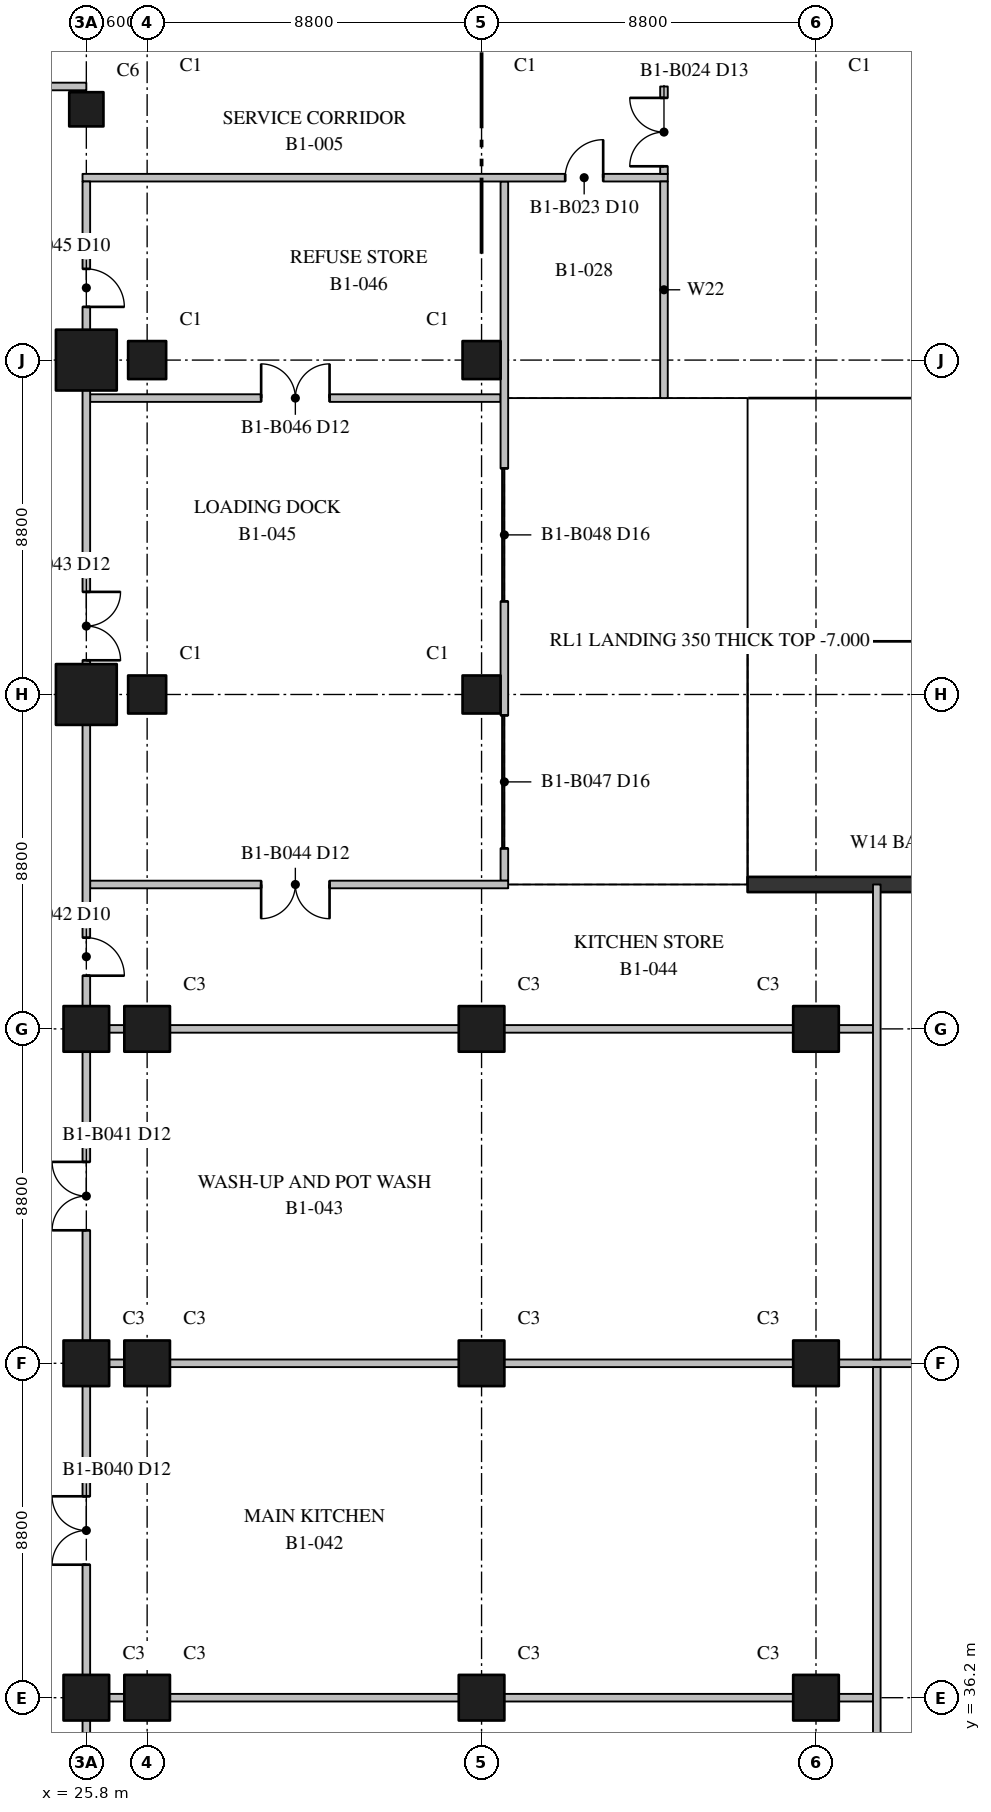
"""IFC4 building model, lengths in metres.
Left out: names, types, materials, properties, quantities, classifications, styles, units other than length and angle.
Written with IfcOpenShell. Run it as: python <this file> out.ifc"""

import sys

from ifc_helpers import new_model, si_unit, direction, frame, frame_2d, origin, origin_2d, place, context, subcontext, project, spatial, polyline, rectangle, outline, extrude, element, fill, save


model = new_model("IFC4")
c1 = context("Model", 3, precision=1e-05, world=origin(), true_north=direction((0.0, 1.0)))
c2 = subcontext(c1, "Body", "Model", "MODEL_VIEW")
j1 = project(units=[si_unit("LENGTHUNIT", "METRE"), si_unit("PLANEANGLEUNIT", "RADIAN")], contexts=[c1])
p1 = place(None, origin())
s1 = spatial("IfcSite", under=j1, at=p1, CompositionType="ELEMENT")
p2 = place(p1, origin())
s2 = spatial("IfcBuilding", under=s1, at=p2, CompositionType="ELEMENT")
p3 = place(p2, frame((0.0, 0.0, -7.0)))
s3 = spatial("IfcBuildingStorey", under=s2, at=p3, CompositionType="ELEMENT", Elevation=-7.0)
for number, where, z_axis, x_axis in (
    (1, (25.8, 36.2, 0.0), (0.0, 0.0, 1.0), (1.0, 0.0, 0.0)),
    (2, (25.8, 45.0, 0.0), (0.0, 0.0, 1.0), (1.0, 0.0, 0.0)),
    (3, (25.8, 53.8, 0.0), (0.0, 0.0, 1.0), (1.0, 0.0, 0.0)),
):
    element("IfcColumn", number, at=place(p3, frame(where, z_axis=z_axis, x_axis=x_axis)), inside=s3, PredefinedType="COLUMN", context=c2, shape_type="SweptSolid", body=[
        extrude(rectangle(XDim=1.2, YDim=1.2, at=origin_2d()), origin(), (0.0, 0.0, 1.0), 7.0),
    ])
for number, where, z_axis, x_axis in (
    (4, (25.8, 62.6, 0.0), (0.0, 0.0, 1.0), (1.0, 0.0, 0.0)),
    (5, (25.8, 71.4, 0.0), (0.0, 0.0, 1.0), (1.0, 0.0, 0.0)),
):
    element("IfcColumn", number, at=place(p3, frame(where, z_axis=z_axis, x_axis=x_axis)), inside=s3, PredefinedType="COLUMN", context=c2, shape_type="SweptSolid", body=[
        extrude(rectangle(XDim=1.6, YDim=1.6, at=origin_2d()), origin(), (0.0, 0.0, 1.0), 7.0),
    ])
for number, where, z_axis, x_axis in (
    (6, (27.4, 36.2, 0.0), (0.0, 0.0, 1.0), (1.0, 0.0, 0.0)),
    (7, (27.4, 45.0, 0.0), (0.0, 0.0, 1.0), (1.0, 0.0, 0.0)),
    (8, (27.4, 53.8, 0.0), (0.0, 0.0, 1.0), (1.0, 0.0, 0.0)),
):
    element("IfcColumn", number, at=place(p3, frame(where, z_axis=z_axis, x_axis=x_axis)), inside=s3, PredefinedType="COLUMN", context=c2, shape_type="SweptSolid", body=[
        extrude(rectangle(XDim=1.2, YDim=1.2, at=origin_2d()), origin(), (0.0, 0.0, 1.0), 7.0),
    ])
for number, where, z_axis, x_axis in (
    (9, (27.4, 62.6, 0.0), (0.0, 0.0, 1.0), (1.0, 0.0, 0.0)),
    (10, (27.4, 71.4, 0.0), (0.0, 0.0, 1.0), (1.0, 0.0, 0.0)),
):
    element("IfcColumn", number, at=place(p3, frame(where, z_axis=z_axis, x_axis=x_axis)), inside=s3, PredefinedType="COLUMN", context=c2, shape_type="SweptSolid", body=[
        extrude(rectangle(XDim=1.0, YDim=1.0, at=origin_2d()), origin(), (0.0, 0.0, 1.0), 7.0),
    ])
for number, where, z_axis, x_axis in (
    (11, (36.2, 36.2, 0.0), (0.0, 0.0, 1.0), (1.0, 0.0, 0.0)),
    (12, (36.2, 45.0, 0.0), (0.0, 0.0, 1.0), (1.0, 0.0, 0.0)),
    (13, (36.2, 53.8, 0.0), (0.0, 0.0, 1.0), (1.0, 0.0, 0.0)),
):
    element("IfcColumn", number, at=place(p3, frame(where, z_axis=z_axis, x_axis=x_axis)), inside=s3, PredefinedType="COLUMN", context=c2, shape_type="SweptSolid", body=[
        extrude(rectangle(XDim=1.2, YDim=1.2, at=origin_2d()), origin(), (0.0, 0.0, 1.0), 7.0),
    ])
for number, where, z_axis, x_axis in (
    (14, (36.2, 62.6, 0.0), (0.0, 0.0, 1.0), (1.0, 0.0, 0.0)),
    (15, (36.2, 71.4, 0.0), (0.0, 0.0, 1.0), (1.0, 0.0, 0.0)),
):
    element("IfcColumn", number, at=place(p3, frame(where, z_axis=z_axis, x_axis=x_axis)), inside=s3, PredefinedType="COLUMN", context=c2, shape_type="SweptSolid", body=[
        extrude(rectangle(XDim=1.0, YDim=1.0, at=origin_2d()), origin(), (0.0, 0.0, 1.0), 7.0),
    ])
for number, where, z_axis, x_axis in (
    (16, (45.0, 36.2, 0.0), (0.0, 0.0, 1.0), (1.0, 0.0, 0.0)),
    (17, (45.0, 45.0, 0.0), (0.0, 0.0, 1.0), (1.0, 0.0, 0.0)),
    (18, (45.0, 53.8, 0.0), (0.0, 0.0, 1.0), (1.0, 0.0, 0.0)),
):
    element("IfcColumn", number, at=place(p3, frame(where, z_axis=z_axis, x_axis=x_axis)), inside=s3, PredefinedType="COLUMN", context=c2, shape_type="SweptSolid", body=[
        extrude(rectangle(XDim=1.2, YDim=1.2, at=origin_2d()), origin(), (0.0, 0.0, 1.0), 7.0),
    ])
p4 = place(p3, frame((25.8, 78.0, 0.0), z_axis=(0.0, 0.0, 1.0), x_axis=(1.0, 0.0, 0.0)))
e19 = element("IfcColumn", 19, at=p4, inside=s3, PredefinedType="COLUMN", context=c2, shape_type="SweptSolid", body=[
    extrude(rectangle(XDim=0.9, YDim=0.9, at=origin_2d()), origin(), (0.0, 0.0, 1.0), 7.0),
])
p5 = place(p3, frame((43.2, 57.6, 0.0), z_axis=(0.0, 0.0, 1.0), x_axis=(1.0, 0.0, 0.0)))
e20 = element("IfcWall", 20, at=p5, inside=s3, PredefinedType="SHEAR", context=c2, shape_type="SweptSolid", body=[
    extrude(outline(polyline([(0.0, 0.0), (27.0, 0.0), (27.0, 4.15), (24.3, 3.7), (21.6, 3.25), (18.9, 2.8), (16.2, 2.35), (13.5, 1.9), (10.8, 1.45), (8.1, 1.0), (5.4, 0.55), (2.7, 0.1), (0.0, 0.05), (0.0, 0.0)])), frame((0.0, 0.2, 0.0), z_axis=(0.0, -1.0, 0.0), x_axis=(1.0, 0.0, 0.0)), (0.0, 0.0, 1.0), 0.4),
])
p6 = place(p3, frame((25.7, 76.2, 0.0), z_axis=(0.0, 0.0, 1.0), x_axis=(1.0, 0.0, 0.0)))
e21 = element("IfcWall", 21, at=p6, inside=s3, PredefinedType="PARTITIONING", context=c2, shape_type="SweptSolid", body=[
    extrude(rectangle(XDim=15.4, YDim=0.2, at=frame_2d((7.7, 0.0))), origin(), (0.0, 0.0, 1.0), 6.5),
])
p7 = place(p6, frame((12.7, 0.0, 0.0)))
e22 = element("IfcOpeningElement", 22, at=p7, cuts=e21, PredefinedType="OPENING", context=c2, shape_type="SweptSolid", body=[
    extrude(rectangle(XDim=1.0, YDim=2.1, at=frame_2d((0.5, 1.05))), frame((0.0, 0.11, 0.0), z_axis=(0.0, -1.0, 0.0), x_axis=(1.0, 0.0, 0.0)), (0.0, 0.0, 1.0), 0.22),
])
p8 = place(p3, frame((2.2, 78.6, 0.0), z_axis=(0.0, 0.0, 1.0), x_axis=(1.0, 0.0, 0.0)))
e23 = element("IfcWall", 23, at=p8, inside=s3, PredefinedType="PARTITIONING", context=c2, shape_type="SweptSolid", body=[
    extrude(rectangle(XDim=23.6, YDim=0.2, at=frame_2d((11.8, 0.0))), origin(), (0.0, 0.0, 1.0), 6.5),
])
p9 = place(p8, frame((4.5, 0.0, 0.0)))
e24 = element("IfcOpeningElement", 24, at=p9, cuts=e23, PredefinedType="OPENING", context=c2, shape_type="SweptSolid", body=[
    extrude(rectangle(XDim=1.0, YDim=2.1, at=frame_2d((0.5, 1.05))), frame((0.0, 0.11, 0.0), z_axis=(0.0, -1.0, 0.0), x_axis=(1.0, 0.0, 0.0)), (0.0, 0.0, 1.0), 0.22),
])
p10 = place(p8, frame((16.3, 0.0, 0.0)))
e25 = element("IfcOpeningElement", 25, at=p10, cuts=e23, PredefinedType="OPENING", context=c2, shape_type="SweptSolid", body=[
    extrude(rectangle(XDim=1.0, YDim=2.1, at=frame_2d((0.5, 1.05))), frame((0.0, 0.11, 0.0), z_axis=(0.0, -1.0, 0.0), x_axis=(1.0, 0.0, 0.0)), (0.0, 0.0, 1.0), 0.22),
])
p11 = place(p3, frame((25.9, 45.0, 0.0), z_axis=(0.0, 0.0, 1.0), x_axis=(1.0, 0.0, 0.0)))
e26 = element("IfcWall", 26, at=p11, inside=s3, PredefinedType="PARTITIONING", context=c2, shape_type="SweptSolid", body=[
    extrude(rectangle(XDim=55.3, YDim=0.2, at=frame_2d((27.65, 0.0))), origin(), (0.0, 0.0, 1.0), 6.5),
])
p12 = place(p11, frame((23.4, 0.0, 0.0)))
e27 = element("IfcOpeningElement", 27, at=p12, cuts=e26, PredefinedType="OPENING", context=c2, shape_type="SweptSolid", body=[
    extrude(rectangle(XDim=1.8, YDim=2.4, at=frame_2d((0.9, 1.2))), frame((0.0, 0.11, 0.0), z_axis=(0.0, -1.0, 0.0), x_axis=(1.0, 0.0, 0.0)), (0.0, 0.0, 1.0), 0.22),
])
p13 = place(p11, frame((31.4, 0.0, 0.0)))
e28 = element("IfcOpeningElement", 28, at=p13, cuts=e26, PredefinedType="OPENING", context=c2, shape_type="SweptSolid", body=[
    extrude(rectangle(XDim=1.8, YDim=2.4, at=frame_2d((0.9, 1.2))), frame((0.0, 0.11, 0.0), z_axis=(0.0, -1.0, 0.0), x_axis=(1.0, 0.0, 0.0)), (0.0, 0.0, 1.0), 0.22),
])
p14 = place(p11, frame((40.2, 0.0, 0.0)))
e29 = element("IfcOpeningElement", 29, at=p14, cuts=e26, PredefinedType="OPENING", context=c2, shape_type="SweptSolid", body=[
    extrude(rectangle(XDim=1.8, YDim=2.4, at=frame_2d((0.9, 1.2))), frame((0.0, 0.11, 0.0), z_axis=(0.0, -1.0, 0.0), x_axis=(1.0, 0.0, 0.0)), (0.0, 0.0, 1.0), 0.22),
])
p15 = place(p11, frame((46.9, 0.0, 0.0)))
e30 = element("IfcOpeningElement", 30, at=p15, cuts=e26, PredefinedType="OPENING", context=c2, shape_type="SweptSolid", body=[
    extrude(rectangle(XDim=1.8, YDim=2.4, at=frame_2d((0.9, 1.2))), frame((0.0, 0.11, 0.0), z_axis=(0.0, -1.0, 0.0), x_axis=(1.0, 0.0, 0.0)), (0.0, 0.0, 1.0), 0.22),
])
for number, where, z_axis, x_axis in (
    (31, (25.9, 36.2, 0.0), (0.0, 0.0, 1.0), (1.0, 0.0, 0.0)),
    (32, (25.9, 53.8, 0.0), (0.0, 0.0, 1.0), (1.0, 0.0, 0.0)),
):
    element("IfcWall", number, at=place(p3, frame(where, z_axis=z_axis, x_axis=x_axis)), inside=s3, PredefinedType="PARTITIONING", context=c2, shape_type="SweptSolid", body=[
        extrude(rectangle(XDim=20.6, YDim=0.2, at=frame_2d((10.3, 0.0))), origin(), (0.0, 0.0, 1.0), 6.5),
    ])
p16 = place(p3, frame((25.9, 57.6, 0.0), z_axis=(0.0, 0.0, 1.0), x_axis=(1.0, 0.0, 0.0)))
e33 = element("IfcWall", 33, at=p16, inside=s3, PredefinedType="PARTITIONING", context=c2, shape_type="SweptSolid", body=[
    extrude(rectangle(XDim=11.0, YDim=0.2, at=frame_2d((5.5, 0.0))), origin(), (0.0, 0.0, 1.0), 6.5),
])
p17 = place(p16, frame((4.5, 0.0, 0.0)))
e34 = element("IfcOpeningElement", 34, at=p17, cuts=e33, PredefinedType="OPENING", context=c2, shape_type="SweptSolid", body=[
    extrude(rectangle(XDim=1.8, YDim=2.1, at=frame_2d((0.9, 1.05))), frame((0.0, 0.11, 0.0), z_axis=(0.0, -1.0, 0.0), x_axis=(1.0, 0.0, 0.0)), (0.0, 0.0, 1.0), 0.22),
])
p18 = place(p3, frame((25.9, 70.4, 0.0), z_axis=(0.0, 0.0, 1.0), x_axis=(1.0, 0.0, 0.0)))
e35 = element("IfcWall", 35, at=p18, inside=s3, PredefinedType="PARTITIONING", context=c2, shape_type="SweptSolid", body=[
    extrude(rectangle(XDim=10.8, YDim=0.2, at=frame_2d((5.4, 0.0))), origin(), (0.0, 0.0, 1.0), 6.5),
])
p19 = place(p18, frame((4.5, 0.0, 0.0)))
e36 = element("IfcOpeningElement", 36, at=p19, cuts=e35, PredefinedType="OPENING", context=c2, shape_type="SweptSolid", body=[
    extrude(rectangle(XDim=1.8, YDim=2.1, at=frame_2d((0.9, 1.05))), frame((0.0, 0.11, 0.0), z_axis=(0.0, -1.0, 0.0), x_axis=(1.0, 0.0, 0.0)), (0.0, 0.0, 1.0), 0.22),
])
p20 = place(p3, frame((25.8, 12.3, 0.0), z_axis=(0.0, 0.0, 1.0), x_axis=(0.0, 1.0, 0.0)))
e37 = element("IfcWall", 37, at=p20, inside=s3, PredefinedType="PARTITIONING", context=c2, shape_type="SweptSolid", body=[
    extrude(rectangle(XDim=63.8, YDim=0.2, at=frame_2d((31.9, 0.0))), origin(), (0.0, 0.0, 1.0), 6.5),
])
p21 = place(p20, frame((18.3, 0.0, 0.0)))
e38 = element("IfcOpeningElement", 38, at=p21, cuts=e37, PredefinedType="OPENING", context=c2, shape_type="SweptSolid", body=[
    extrude(rectangle(XDim=1.8, YDim=2.1, at=frame_2d((0.9, 1.05))), frame((0.0, 0.11, 0.0), z_axis=(0.0, -1.0, 0.0), x_axis=(1.0, 0.0, 0.0)), (0.0, 0.0, 1.0), 0.22),
])
p22 = place(p20, frame((27.4, 0.0, 0.0)))
e39 = element("IfcOpeningElement", 39, at=p22, cuts=e37, PredefinedType="OPENING", context=c2, shape_type="SweptSolid", body=[
    extrude(rectangle(XDim=1.8, YDim=2.1, at=frame_2d((0.9, 1.05))), frame((0.0, 0.11, 0.0), z_axis=(0.0, -1.0, 0.0), x_axis=(1.0, 0.0, 0.0)), (0.0, 0.0, 1.0), 0.22),
])
p23 = place(p20, frame((36.2, 0.0, 0.0)))
e40 = element("IfcOpeningElement", 40, at=p23, cuts=e37, PredefinedType="OPENING", context=c2, shape_type="SweptSolid", body=[
    extrude(rectangle(XDim=1.8, YDim=2.1, at=frame_2d((0.9, 1.05))), frame((0.0, 0.11, 0.0), z_axis=(0.0, -1.0, 0.0), x_axis=(1.0, 0.0, 0.0)), (0.0, 0.0, 1.0), 0.22),
])
p24 = place(p20, frame((42.9, 0.0, 0.0)))
e41 = element("IfcOpeningElement", 41, at=p24, cuts=e37, PredefinedType="OPENING", context=c2, shape_type="SweptSolid", body=[
    extrude(rectangle(XDim=1.0, YDim=2.1, at=frame_2d((0.5, 1.05))), frame((0.0, 0.11, 0.0), z_axis=(0.0, -1.0, 0.0), x_axis=(1.0, 0.0, 0.0)), (0.0, 0.0, 1.0), 0.22),
])
p25 = place(p20, frame((51.2, 0.0, 0.0)))
e42 = element("IfcOpeningElement", 42, at=p25, cuts=e37, PredefinedType="OPENING", context=c2, shape_type="SweptSolid", body=[
    extrude(rectangle(XDim=1.8, YDim=2.1, at=frame_2d((0.9, 1.05))), frame((0.0, 0.11, 0.0), z_axis=(0.0, -1.0, 0.0), x_axis=(1.0, 0.0, 0.0)), (0.0, 0.0, 1.0), 0.22),
])
p26 = place(p20, frame((60.5, 0.0, 0.0)))
e43 = element("IfcOpeningElement", 43, at=p26, cuts=e37, PredefinedType="OPENING", context=c2, shape_type="SweptSolid", body=[
    extrude(rectangle(XDim=1.0, YDim=2.1, at=frame_2d((0.5, 1.05))), frame((0.0, 0.11, 0.0), z_axis=(0.0, -1.0, 0.0), x_axis=(1.0, 0.0, 0.0)), (0.0, 0.0, 1.0), 0.22),
])
p27 = place(p3, frame((41.0, 70.4, 0.0), z_axis=(0.0, 0.0, 1.0), x_axis=(0.0, 1.0, 0.0)))
e44 = element("IfcWall", 44, at=p27, inside=s3, PredefinedType="PARTITIONING", context=c2, shape_type="SweptSolid", body=[
    extrude(rectangle(XDim=5.7, YDim=0.2, at=frame_2d((2.85, 0.0))), origin(), (0.0, 0.0, 1.0), 6.5),
])
p28 = place(p3, frame((41.0, 76.3, 0.0), z_axis=(0.0, 0.0, 1.0), x_axis=(0.0, 1.0, 0.0)))
e45 = element("IfcWall", 45, at=p28, inside=s3, PredefinedType="PARTITIONING", context=c2, shape_type="SweptSolid", body=[
    extrude(rectangle(XDim=2.3, YDim=0.2, at=frame_2d((1.15, 0.0))), origin(), (0.0, 0.0, 1.0), 6.5),
])
p29 = place(p28, frame((0.2, 0.0, 0.0)))
e46 = element("IfcOpeningElement", 46, at=p29, cuts=e45, PredefinedType="OPENING", context=c2, shape_type="SweptSolid", body=[
    extrude(rectangle(XDim=1.8, YDim=2.1, at=frame_2d((0.9, 1.05))), frame((0.0, 0.11, 0.0), z_axis=(0.0, -1.0, 0.0), x_axis=(1.0, 0.0, 0.0)), (0.0, 0.0, 1.0), 0.22),
])
p30 = place(p3, frame((36.8, 57.7, 0.0), z_axis=(0.0, 0.0, 1.0), x_axis=(0.0, 1.0, 0.0)))
e47 = element("IfcWall", 47, at=p30, inside=s3, PredefinedType="PARTITIONING", context=c2, shape_type="SweptSolid", body=[
    extrude(rectangle(XDim=18.4, YDim=0.2, at=frame_2d((9.2, 0.0))), origin(), (0.0, 0.0, 1.0), 6.5),
])
p31 = place(p30, frame((0.85, 0.0, 0.0)))
e48 = element("IfcOpeningElement", 48, at=p31, cuts=e47, PredefinedType="OPENING", context=c2, shape_type="SweptSolid", body=[
    extrude(rectangle(XDim=3.5, YDim=4.5, at=frame_2d((1.75, 2.25))), frame((0.0, 0.11, 0.0), z_axis=(0.0, -1.0, 0.0), x_axis=(1.0, 0.0, 0.0)), (0.0, 0.0, 1.0), 0.22),
])
p32 = place(p30, frame((7.35, 0.0, 0.0)))
e49 = element("IfcOpeningElement", 49, at=p32, cuts=e47, PredefinedType="OPENING", context=c2, shape_type="SweptSolid", body=[
    extrude(rectangle(XDim=3.5, YDim=4.5, at=frame_2d((1.75, 2.25))), frame((0.0, 0.11, 0.0), z_axis=(0.0, -1.0, 0.0), x_axis=(1.0, 0.0, 0.0)), (0.0, 0.0, 1.0), 0.22),
])
p33 = place(p3, frame((46.6, 26.9, 0.0), z_axis=(0.0, 0.0, 1.0), x_axis=(0.0, 1.0, 0.0)))
e50 = element("IfcWall", 50, at=p33, inside=s3, PredefinedType="PARTITIONING", context=c2, shape_type="SweptSolid", body=[
    extrude(rectangle(XDim=18.0, YDim=0.2, at=frame_2d((9.0, 0.0))), origin(), (0.0, 0.0, 1.0), 6.5),
])
p34 = place(p3, frame((46.6, 45.1, 0.0), z_axis=(0.0, 0.0, 1.0), x_axis=(0.0, 1.0, 0.0)))
e51 = element("IfcWall", 51, at=p34, inside=s3, PredefinedType="PARTITIONING", context=c2, shape_type="SweptSolid", body=[
    extrude(rectangle(XDim=12.5, YDim=0.2, at=frame_2d((6.25, 0.0))), origin(), (0.0, 0.0, 1.0), 6.5),
])
p35 = place(p7, origin())
e52 = element("IfcDoor", 52, at=p35, inside=s3, OperationType="SINGLE_SWING_RIGHT", PredefinedType="DOOR", context=c2, shape_type="SweptSolid", body=[
    extrude(rectangle(XDim=1.0, YDim=2.1, at=frame_2d((0.5, 1.05))), frame((0.0, 0.025, 0.0), z_axis=(0.0, -1.0, 0.0), x_axis=(1.0, 0.0, 0.0)), (0.0, 0.0, 1.0), 0.05),
])
fill(e22, e52)
p36 = place(p29, origin())
e53 = element("IfcDoor", 53, at=p36, inside=s3, OperationType="DOUBLE_DOOR_SINGLE_SWING", PredefinedType="DOOR", context=c2, shape_type="SweptSolid", body=[
    extrude(rectangle(XDim=1.8, YDim=2.1, at=frame_2d((0.9, 1.05))), frame((0.0, 0.025, 0.0), z_axis=(0.0, -1.0, 0.0), x_axis=(1.0, 0.0, 0.0)), (0.0, 0.0, 1.0), 0.05),
])
fill(e46, e53)
p37 = place(p22, origin())
e54 = element("IfcDoor", 54, at=p37, inside=s3, OperationType="DOUBLE_DOOR_SINGLE_SWING", PredefinedType="DOOR", context=c2, shape_type="SweptSolid", body=[
    extrude(rectangle(XDim=1.8, YDim=2.1, at=frame_2d((0.9, 1.05))), frame((0.0, 0.025, 0.0), z_axis=(0.0, -1.0, 0.0), x_axis=(1.0, 0.0, 0.0)), (0.0, 0.0, 1.0), 0.05),
])
fill(e39, e54)
p38 = place(p23, origin())
e55 = element("IfcDoor", 55, at=p38, inside=s3, OperationType="DOUBLE_DOOR_SINGLE_SWING", PredefinedType="DOOR", context=c2, shape_type="SweptSolid", body=[
    extrude(rectangle(XDim=1.8, YDim=2.1, at=frame_2d((0.9, 1.05))), frame((0.0, 0.025, 0.0), z_axis=(0.0, -1.0, 0.0), x_axis=(1.0, 0.0, 0.0)), (0.0, 0.0, 1.0), 0.05),
])
fill(e40, e55)
p39 = place(p24, frame((1.0, 0.0, 0.0), z_axis=(0.0, 0.0, 1.0), x_axis=(-1.0, 0.0, 0.0)))
e56 = element("IfcDoor", 56, at=p39, inside=s3, OperationType="SINGLE_SWING_LEFT", PredefinedType="DOOR", context=c2, shape_type="SweptSolid", body=[
    extrude(rectangle(XDim=1.0, YDim=2.1, at=frame_2d((0.5, 1.05))), frame((0.0, 0.025, 0.0), z_axis=(0.0, -1.0, 0.0), x_axis=(1.0, 0.0, 0.0)), (0.0, 0.0, 1.0), 0.05),
])
fill(e41, e56)
p40 = place(p25, frame((1.8, 0.0, 0.0), z_axis=(0.0, 0.0, 1.0), x_axis=(-1.0, 0.0, 0.0)))
e57 = element("IfcDoor", 57, at=p40, inside=s3, OperationType="DOUBLE_DOOR_SINGLE_SWING", PredefinedType="DOOR", context=c2, shape_type="SweptSolid", body=[
    extrude(rectangle(XDim=1.8, YDim=2.1, at=frame_2d((0.9, 1.05))), frame((0.0, 0.025, 0.0), z_axis=(0.0, -1.0, 0.0), x_axis=(1.0, 0.0, 0.0)), (0.0, 0.0, 1.0), 0.05),
])
fill(e42, e57)
p41 = place(p17, frame((1.8, 0.0, 0.0), z_axis=(0.0, 0.0, 1.0), x_axis=(-1.0, 0.0, 0.0)))
e58 = element("IfcDoor", 58, at=p41, inside=s3, OperationType="DOUBLE_DOOR_SINGLE_SWING", PredefinedType="DOOR", context=c2, shape_type="SweptSolid", body=[
    extrude(rectangle(XDim=1.8, YDim=2.1, at=frame_2d((0.9, 1.05))), frame((0.0, 0.025, 0.0), z_axis=(0.0, -1.0, 0.0), x_axis=(1.0, 0.0, 0.0)), (0.0, 0.0, 1.0), 0.05),
])
fill(e34, e58)
p42 = place(p26, frame((1.0, 0.0, 0.0), z_axis=(0.0, 0.0, 1.0), x_axis=(-1.0, 0.0, 0.0)))
e59 = element("IfcDoor", 59, at=p42, inside=s3, OperationType="SINGLE_SWING_LEFT", PredefinedType="DOOR", context=c2, shape_type="SweptSolid", body=[
    extrude(rectangle(XDim=1.0, YDim=2.1, at=frame_2d((0.5, 1.05))), frame((0.0, 0.025, 0.0), z_axis=(0.0, -1.0, 0.0), x_axis=(1.0, 0.0, 0.0)), (0.0, 0.0, 1.0), 0.05),
])
fill(e43, e59)
p43 = place(p19, origin())
e60 = element("IfcDoor", 60, at=p43, inside=s3, OperationType="DOUBLE_DOOR_SINGLE_SWING", PredefinedType="DOOR", context=c2, shape_type="SweptSolid", body=[
    extrude(rectangle(XDim=1.8, YDim=2.1, at=frame_2d((0.9, 1.05))), frame((0.0, 0.025, 0.0), z_axis=(0.0, -1.0, 0.0), x_axis=(1.0, 0.0, 0.0)), (0.0, 0.0, 1.0), 0.05),
])
fill(e36, e60)
p44 = place(p31, origin())
e61 = element("IfcDoor", 61, at=p44, inside=s3, OperationType="ROLLINGUP", PredefinedType="DOOR", context=c2, shape_type="SweptSolid", body=[
    extrude(rectangle(XDim=3.5, YDim=4.5, at=frame_2d((1.75, 2.25))), frame((0.0, 0.025, 0.0), z_axis=(0.0, -1.0, 0.0), x_axis=(1.0, 0.0, 0.0)), (0.0, 0.0, 1.0), 0.05),
])
fill(e48, e61)
p45 = place(p32, origin())
e62 = element("IfcDoor", 62, at=p45, inside=s3, OperationType="ROLLINGUP", PredefinedType="DOOR", context=c2, shape_type="SweptSolid", body=[
    extrude(rectangle(XDim=3.5, YDim=4.5, at=frame_2d((1.75, 2.25))), frame((0.0, 0.025, 0.0), z_axis=(0.0, -1.0, 0.0), x_axis=(1.0, 0.0, 0.0)), (0.0, 0.0, 1.0), 0.05),
])
fill(e49, e62)
save(model, sys.argv[1])
